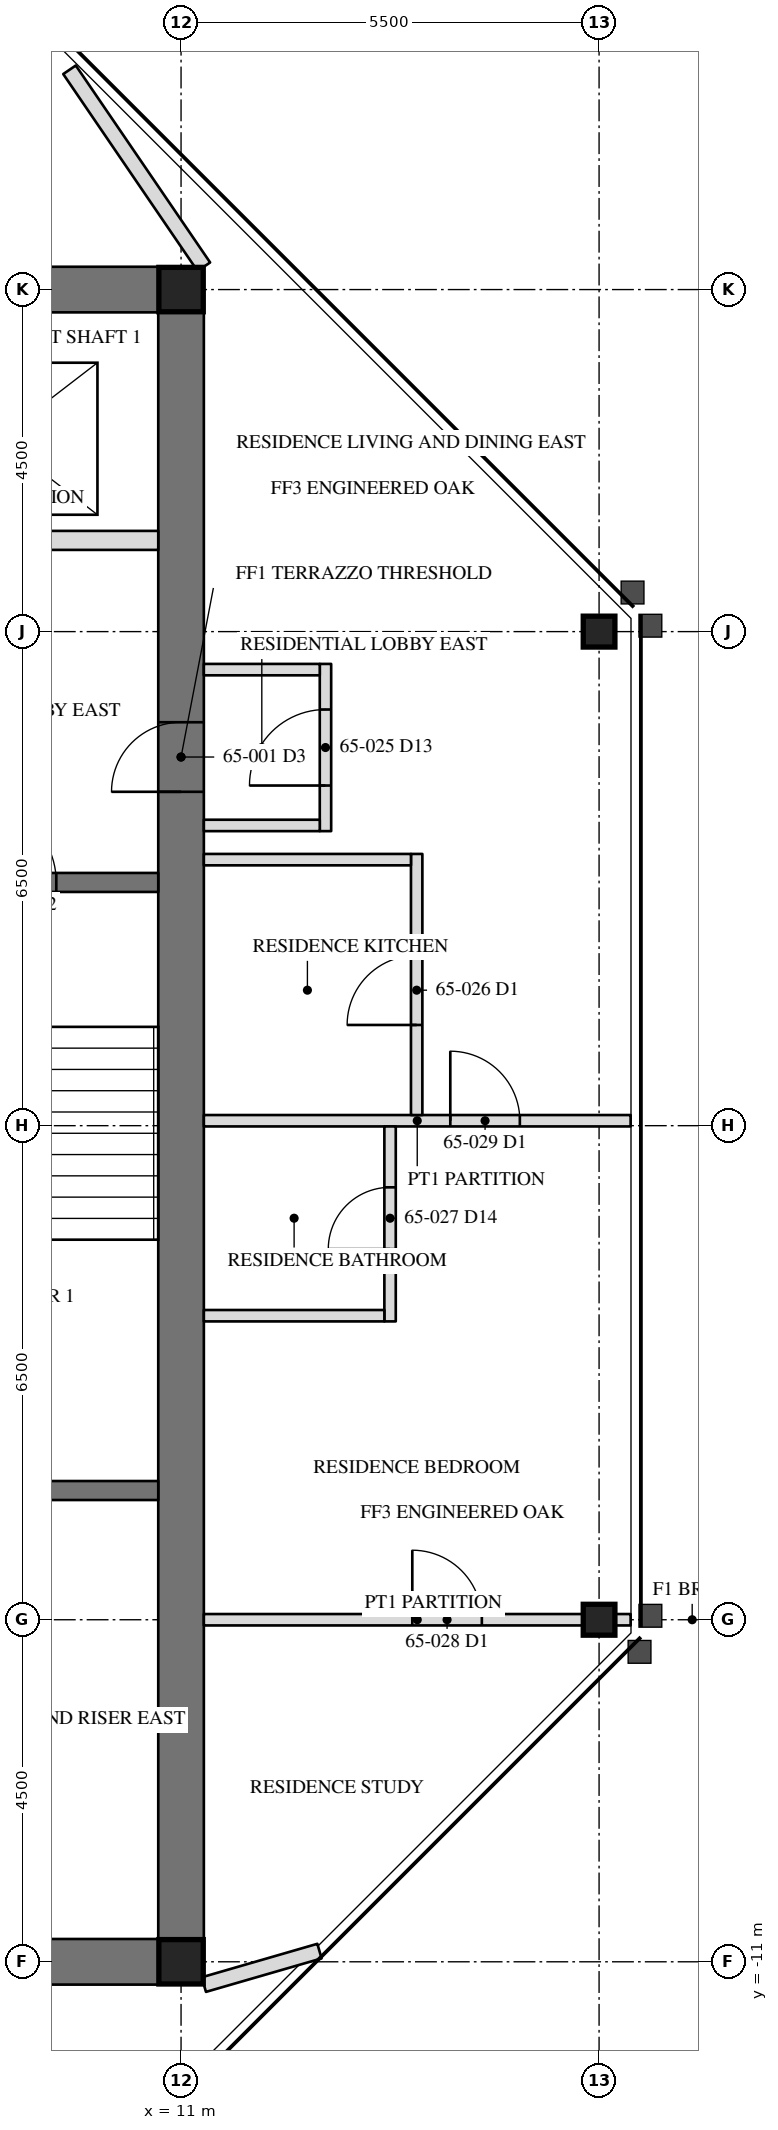
"""IFC4 building model, lengths in metres.
Left out: names, types, materials, properties, quantities, classifications, styles, units other than length and angle.
Written with IfcOpenShell. Run it as: python <this file> out.ifc"""

import sys

from ifc_helpers import new_model, si_unit, direction, frame, frame_2d, origin, origin_2d, place, context, subcontext, project, spatial, rectangle, hollow_rectangle, i_section, extrude, element, fill, save


model = new_model("IFC4")
c1 = context("Model", 3, precision=1e-05, world=origin(), true_north=direction((0.0, 1.0)))
c2 = subcontext(c1, "Body", "Model", "MODEL_VIEW")
j1 = project(units=[si_unit("LENGTHUNIT", "METRE"), si_unit("PLANEANGLEUNIT", "RADIAN")], contexts=[c1])
p1 = place(None, origin())
s1 = spatial("IfcSite", under=j1, at=p1, CompositionType="ELEMENT")
p2 = place(p1, origin())
s2 = spatial("IfcBuilding", under=s1, at=p2, CompositionType="ELEMENT")
p3 = place(p2, frame((0.0, 0.0, 266.8)))
s3 = spatial("IfcBuildingStorey", under=s2, at=p3, CompositionType="ELEMENT", Elevation=266.8)
for number, where, z_axis, x_axis in (
    (1, (16.5, -6.5, 0.0), (0.0, 0.0, 1.0), (0.0, 1.0, 0.0)),
    (2, (16.5, 6.5, 0.0), (0.0, 0.0, 1.0), (0.0, 1.0, 0.0)),
):
    element("IfcColumn", number, at=place(p3, frame(where, z_axis=z_axis, x_axis=x_axis)), inside=s3, PredefinedType="COLUMN", context=c2, shape_type="SweptSolid", body=[
        extrude(i_section(OverallWidth=0.406, OverallDepth=0.417, WebThickness=0.03, FlangeThickness=0.048, at=origin_2d()), origin(), (0.0, 0.0, 1.0), 3.6),
    ])
p4 = place(p3, frame((11.0, -11.0, 0.0), z_axis=(0.0, 0.0, 1.0), x_axis=(0.0, 1.0, 0.0)))
e3 = element("IfcWall", 3, at=p4, inside=s3, PredefinedType="SHEAR", context=c2, shape_type="SweptSolid", body=[
    extrude(rectangle(XDim=22.0, YDim=0.6, at=frame_2d((11.0, 0.0))), origin(), (0.0, 0.0, 1.0), 3.6),
])
p5 = place(p4, frame((15.393, 0.0, 0.0)))
e4 = element("IfcOpeningElement", 4, at=p5, cuts=e3, PredefinedType="OPENING", context=c2, shape_type="SweptSolid", body=[
    extrude(rectangle(XDim=0.915, YDim=2.134, at=frame_2d((0.458, 1.067))), frame((0.0, 0.31, 0.0), z_axis=(0.0, -1.0, 0.0), x_axis=(1.0, 0.0, 0.0)), (0.0, 0.0, 1.0), 0.62),
])
for number, where, z_axis, x_axis in (
    (5, (11.0, 11.0, 0.0), (0.0, 0.0, 1.0), (-1.0, 0.0, 0.0)),
    (6, (6.5, -11.0, 0.0), (0.0, 0.0, 1.0), (1.0, 0.0, 0.0)),
):
    element("IfcWall", number, at=place(p3, frame(where, z_axis=z_axis, x_axis=x_axis)), inside=s3, PredefinedType="SHEAR", context=c2, shape_type="SweptSolid", body=[
        extrude(rectangle(XDim=4.5, YDim=0.6, at=frame_2d((2.25, 0.0))), origin(), (0.0, 0.0, 1.0), 3.6),
    ])
for number, where, z_axis, x_axis in (
    (7, (11.0, 11.0, 0.0), (0.0, 0.0, 1.0), (1.0, 0.0, 0.0)),
    (8, (11.0, -11.0, 0.0), (0.0, 0.0, 1.0), (1.0, 0.0, 0.0)),
):
    element("IfcColumn", number, at=place(p3, frame(where, z_axis=z_axis, x_axis=x_axis)), inside=s3, PredefinedType="COLUMN", context=c2, shape_type="SweptSolid", body=[
        extrude(hollow_rectangle(XDim=0.584, YDim=0.584, WallThickness=0.051, at=origin_2d()), origin(), (0.0, 0.0, 1.0), 3.6),
    ])
p6 = place(p3, frame((6.95, -4.8, 0.0), z_axis=(0.0, 0.0, 1.0), x_axis=(1.0, 0.0, 0.0)))
e9 = element("IfcWall", 9, at=p6, inside=s3, PredefinedType="SOLIDWALL", context=c2, shape_type="SweptSolid", body=[
    extrude(rectangle(XDim=3.75, YDim=0.25, at=frame_2d((1.875, 0.0))), origin(), (0.0, 0.0, 1.0), 3.41),
])
p7 = place(p3, frame((6.95, 3.2, 0.0), z_axis=(0.0, 0.0, 1.0), x_axis=(1.0, 0.0, 0.0)))
e10 = element("IfcWall", 10, at=p7, inside=s3, PredefinedType="SOLIDWALL", context=c2, shape_type="SweptSolid", body=[
    extrude(rectangle(XDim=3.75, YDim=0.25, at=frame_2d((1.875, 0.0))), origin(), (0.0, 0.0, 1.0), 3.41),
])
p8 = place(p7, frame((1.342, 0.0, 0.0)))
e11 = element("IfcOpeningElement", 11, at=p8, cuts=e10, PredefinedType="OPENING", context=c2, shape_type="SweptSolid", body=[
    extrude(rectangle(XDim=1.067, YDim=2.134, at=frame_2d((0.533, 1.067))), frame((0.0, 0.135, 0.0), z_axis=(0.0, -1.0, 0.0), x_axis=(1.0, 0.0, 0.0)), (0.0, 0.0, 1.0), 0.27),
])
p9 = place(p3, frame((6.95, 7.7, 0.0), z_axis=(0.0, 0.0, 1.0), x_axis=(1.0, 0.0, 0.0)))
e12 = element("IfcWall", 12, at=p9, inside=s3, PredefinedType="PARTITIONING", context=c2, shape_type="SweptSolid", body=[
    extrude(rectangle(XDim=3.75, YDim=0.25, at=frame_2d((1.875, 0.0))), origin(), (0.0, 0.0, 1.0), 3.41),
])
p10 = place(p9, frame((0.45, 0.0, 0.0)))
e13 = element("IfcOpeningElement", 13, at=p10, cuts=e12, PredefinedType="OPENING", context=c2, shape_type="SweptSolid", body=[
    extrude(rectangle(XDim=1.219, YDim=2.134, at=frame_2d((0.609, 1.067))), frame((0.0, 0.135, 0.0), z_axis=(0.0, -1.0, 0.0), x_axis=(1.0, 0.0, 0.0)), (0.0, 0.0, 1.0), 0.27),
])
p11 = place(p3, frame((11.3, 11.3, 0.0), z_axis=(0.0, 0.0, 1.0), x_axis=(-0.563469639691, 0.826136771453, 0.0)))
e14 = element("IfcWall", 14, at=p11, inside=s3, PredefinedType="PARTITIONING", context=c2, shape_type="SweptSolid", body=[
    extrude(rectangle(XDim=3.137, YDim=0.2, at=frame_2d((1.568, 0.0))), origin(), (0.0, 0.0, 1.0), 2.704),
])
p12 = place(p3, frame((11.3, -11.3, 0.0), z_axis=(0.0, 0.0, 1.0), x_axis=(0.960552344683, 0.278099250491, 0.0)))
e15 = element("IfcWall", 15, at=p12, inside=s3, PredefinedType="PARTITIONING", context=c2, shape_type="SweptSolid", body=[
    extrude(rectangle(XDim=1.584, YDim=0.2, at=frame_2d((0.792, 0.0))), origin(), (0.0, 0.0, 1.0), 3.41),
])
p13 = place(p3, frame((11.3, -6.5, 0.0), z_axis=(0.0, 0.0, 1.0), x_axis=(1.0, 0.0, 0.0)))
e16 = element("IfcWall", 16, at=p13, inside=s3, PredefinedType="PARTITIONING", context=c2, shape_type="SweptSolid", body=[
    extrude(rectangle(XDim=5.615, YDim=0.15, at=frame_2d((2.808, 0.0))), origin(), (0.0, 0.0, 1.0), 2.966),
])
p14 = place(p13, frame((2.742, 0.0, 0.0)))
e17 = element("IfcOpeningElement", 17, at=p14, cuts=e16, PredefinedType="OPENING", context=c2, shape_type="SweptSolid", body=[
    extrude(rectangle(XDim=0.915, YDim=2.134, at=frame_2d((0.458, 1.067))), frame((0.0, 0.085, 0.0), z_axis=(0.0, -1.0, 0.0), x_axis=(1.0, 0.0, 0.0)), (0.0, 0.0, 1.0), 0.17),
])
p15 = place(p3, frame((11.3, 0.065, 0.0), z_axis=(0.0, 0.0, 1.0), x_axis=(1.0, 0.0, 0.0)))
e18 = element("IfcWall", 18, at=p15, inside=s3, PredefinedType="PARTITIONING", context=c2, shape_type="SweptSolid", body=[
    extrude(rectangle(XDim=5.615, YDim=0.15, at=frame_2d((2.808, 0.0))), origin(), (0.0, 0.0, 1.0), 2.709),
])
p16 = place(p15, frame((3.242, 0.0, 0.0)))
e19 = element("IfcOpeningElement", 19, at=p16, cuts=e18, PredefinedType="OPENING", context=c2, shape_type="SweptSolid", body=[
    extrude(rectangle(XDim=0.915, YDim=2.134, at=frame_2d((0.458, 1.067))), frame((0.0, 0.085, 0.0), z_axis=(0.0, -1.0, 0.0), x_axis=(1.0, 0.0, 0.0)), (0.0, 0.0, 1.0), 0.17),
])
p17 = place(p3, frame((12.9, 3.875, 0.0), z_axis=(0.0, 0.0, 1.0), x_axis=(0.0, 1.0, 0.0)))
e20 = element("IfcWall", 20, at=p17, inside=s3, PredefinedType="PARTITIONING", context=c2, shape_type="SweptSolid", body=[
    extrude(rectangle(XDim=2.2, YDim=0.15, at=frame_2d((1.1, 0.0))), origin(), (0.0, 0.0, 1.0), 3.41),
])
p18 = place(p17, frame((0.6, 0.0, 0.0)))
e21 = element("IfcOpeningElement", 21, at=p18, cuts=e20, PredefinedType="OPENING", context=c2, shape_type="SweptSolid", body=[
    extrude(rectangle(XDim=1.0, YDim=2.134, at=frame_2d((0.5, 1.067))), frame((0.0, 0.085, 0.0), z_axis=(0.0, -1.0, 0.0), x_axis=(1.0, 0.0, 0.0)), (0.0, 0.0, 1.0), 0.17),
])
for number, where, z_axis, x_axis in (
    (22, (11.3, 3.95, 0.0), (0.0, 0.0, 1.0), (1.0, 0.0, 0.0)),
    (23, (11.3, 6.0, 0.0), (0.0, 0.0, 1.0), (1.0, 0.0, 0.0)),
):
    element("IfcWall", number, at=place(p3, frame(where, z_axis=z_axis, x_axis=x_axis)), inside=s3, PredefinedType="PARTITIONING", context=c2, shape_type="SweptSolid", body=[
        extrude(rectangle(XDim=1.525, YDim=0.15, at=frame_2d((0.762, 0.0))), origin(), (0.0, 0.0, 1.0), 3.41),
    ])
p19 = place(p3, frame((14.1, 0.14, 0.0), z_axis=(0.0, 0.0, 1.0), x_axis=(0.0, 1.0, 0.0)))
e24 = element("IfcWall", 24, at=p19, inside=s3, PredefinedType="PARTITIONING", context=c2, shape_type="SweptSolid", body=[
    extrude(rectangle(XDim=3.435, YDim=0.15, at=frame_2d((1.718, 0.0))), origin(), (0.0, 0.0, 1.0), 3.41),
])
p20 = place(p19, frame((1.185, 0.0, 0.0)))
e25 = element("IfcOpeningElement", 25, at=p20, cuts=e24, PredefinedType="OPENING", context=c2, shape_type="SweptSolid", body=[
    extrude(rectangle(XDim=0.915, YDim=2.134, at=frame_2d((0.458, 1.067))), frame((0.0, 0.085, 0.0), z_axis=(0.0, -1.0, 0.0), x_axis=(1.0, 0.0, 0.0)), (0.0, 0.0, 1.0), 0.17),
])
p21 = place(p3, frame((11.3, 3.5, 0.0), z_axis=(0.0, 0.0, 1.0), x_axis=(1.0, 0.0, 0.0)))
e26 = element("IfcWall", 26, at=p21, inside=s3, PredefinedType="PARTITIONING", context=c2, shape_type="SweptSolid", body=[
    extrude(rectangle(XDim=2.725, YDim=0.15, at=frame_2d((1.362, 0.0))), origin(), (0.0, 0.0, 1.0), 3.41),
])
p22 = place(p3, frame((13.75, -2.575, 0.0), z_axis=(0.0, 0.0, 1.0), x_axis=(0.0, 1.0, 0.0)))
e27 = element("IfcWall", 27, at=p22, inside=s3, PredefinedType="PARTITIONING", context=c2, shape_type="SweptSolid", body=[
    extrude(rectangle(XDim=2.565, YDim=0.15, at=frame_2d((1.282, 0.0))), origin(), (0.0, 0.0, 1.0), 3.41),
])
p23 = place(p22, frame((0.951, 0.0, 0.0)))
e28 = element("IfcOpeningElement", 28, at=p23, cuts=e27, PredefinedType="OPENING", context=c2, shape_type="SweptSolid", body=[
    extrude(rectangle(XDim=0.813, YDim=2.032, at=frame_2d((0.406, 1.016))), frame((0.0, 0.085, 0.0), z_axis=(0.0, -1.0, 0.0), x_axis=(1.0, 0.0, 0.0)), (0.0, 0.0, 1.0), 0.17),
])
p24 = place(p3, frame((11.3, -2.5, 0.0), z_axis=(0.0, 0.0, 1.0), x_axis=(1.0, 0.0, 0.0)))
e29 = element("IfcWall", 29, at=p24, inside=s3, PredefinedType="PARTITIONING", context=c2, shape_type="SweptSolid", body=[
    extrude(rectangle(XDim=2.375, YDim=0.15, at=frame_2d((1.188, 0.0))), origin(), (0.0, 0.0, 1.0), 3.41),
])
p25 = place(p5, origin())
e30 = element("IfcDoor", 30, at=p25, inside=s3, OperationType="SINGLE_SWING_RIGHT", PredefinedType="DOOR", context=c2, shape_type="SweptSolid", body=[
    extrude(rectangle(XDim=0.915, YDim=2.134, at=frame_2d((0.458, 1.067))), frame((0.0, -0.225, 0.0), z_axis=(0.0, -1.0, 0.0), x_axis=(1.0, 0.0, 0.0)), (0.0, 0.0, 1.0), 0.05),
])
fill(e4, e30)
p26 = place(p8, origin())
e31 = element("IfcDoor", 31, at=p26, inside=s3, OperationType="SINGLE_SWING_LEFT", PredefinedType="DOOR", context=c2, shape_type="SweptSolid", body=[
    extrude(rectangle(XDim=1.067, YDim=2.134, at=frame_2d((0.533, 1.067))), frame((0.0, 0.025, 0.0), z_axis=(0.0, -1.0, 0.0), x_axis=(1.0, 0.0, 0.0)), (0.0, 0.0, 1.0), 0.05),
])
fill(e11, e31)
p27 = place(p18, origin())
e32 = element("IfcDoor", 32, at=p27, inside=s3, OperationType="SINGLE_SWING_RIGHT", PredefinedType="DOOR", context=c2, shape_type="SweptSolid", body=[
    extrude(rectangle(XDim=1.0, YDim=2.134, at=frame_2d((0.5, 1.067))), frame((0.0, 0.025, 0.0), z_axis=(0.0, -1.0, 0.0), x_axis=(1.0, 0.0, 0.0)), (0.0, 0.0, 1.0), 0.05),
])
fill(e21, e32)
p28 = place(p20, origin())
e33 = element("IfcDoor", 33, at=p28, inside=s3, OperationType="SINGLE_SWING_LEFT", PredefinedType="DOOR", context=c2, shape_type="SweptSolid", body=[
    extrude(rectangle(XDim=0.915, YDim=2.134, at=frame_2d((0.458, 1.067))), frame((0.0, 0.025, 0.0), z_axis=(0.0, -1.0, 0.0), x_axis=(1.0, 0.0, 0.0)), (0.0, 0.0, 1.0), 0.05),
])
fill(e25, e33)
p29 = place(p23, origin())
e34 = element("IfcDoor", 34, at=p29, inside=s3, OperationType="SINGLE_SWING_LEFT", PredefinedType="DOOR", context=c2, shape_type="SweptSolid", body=[
    extrude(rectangle(XDim=0.813, YDim=2.032, at=frame_2d((0.406, 1.016))), frame((0.0, 0.025, 0.0), z_axis=(0.0, -1.0, 0.0), x_axis=(1.0, 0.0, 0.0)), (0.0, 0.0, 1.0), 0.05),
])
fill(e28, e34)
p30 = place(p14, origin())
e35 = element("IfcDoor", 35, at=p30, inside=s3, OperationType="SINGLE_SWING_LEFT", PredefinedType="DOOR", context=c2, shape_type="SweptSolid", body=[
    extrude(rectangle(XDim=0.915, YDim=2.134, at=frame_2d((0.458, 1.067))), frame((0.0, 0.025, 0.0), z_axis=(0.0, -1.0, 0.0), x_axis=(1.0, 0.0, 0.0)), (0.0, 0.0, 1.0), 0.05),
])
fill(e17, e35)
p31 = place(p16, origin())
e36 = element("IfcDoor", 36, at=p31, inside=s3, OperationType="SINGLE_SWING_LEFT", PredefinedType="DOOR", context=c2, shape_type="SweptSolid", body=[
    extrude(rectangle(XDim=0.915, YDim=2.134, at=frame_2d((0.458, 1.067))), frame((0.0, 0.025, 0.0), z_axis=(0.0, -1.0, 0.0), x_axis=(1.0, 0.0, 0.0)), (0.0, 0.0, 1.0), 0.05),
])
fill(e19, e36)
save(model, sys.argv[1])
